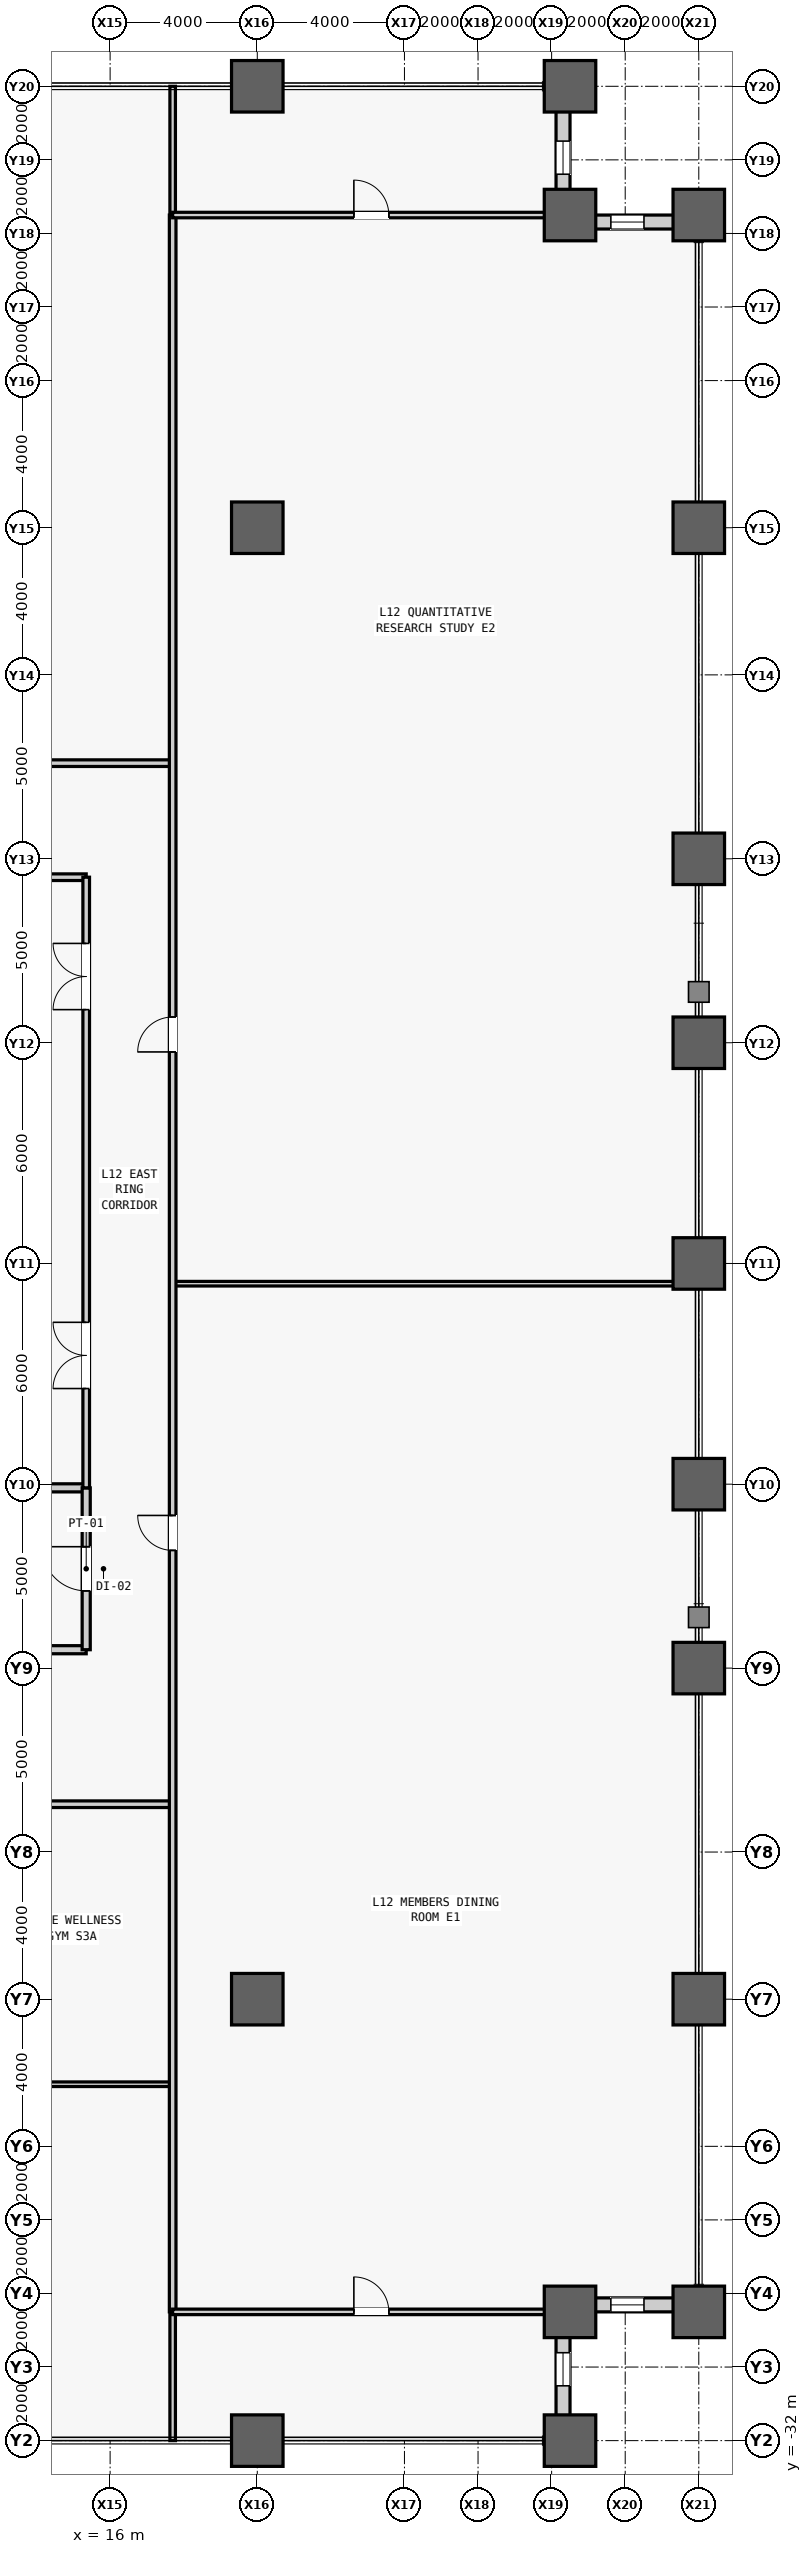
"""IFC4 building model, lengths in metres.
Left out: names, types, materials, properties, quantities, classifications, styles, units other than length and angle.
Written with IfcOpenShell. Run it as: python <this file> out.ifc"""

import sys

from ifc_helpers import new_model, si_unit, direction, frame, frame_2d, origin, origin_2d, place, context, subcontext, project, spatial, rectangle, hollow_rectangle, extrude, source, transform, mapped, element, fill, save


model = new_model("IFC4")
c1 = context("Model", 3, precision=1e-05, world=origin(), true_north=direction((0.0, 1.0)))
c2 = subcontext(c1, "Body", "Model", "MODEL_VIEW")
j1 = project(units=[si_unit("LENGTHUNIT", "METRE"), si_unit("PLANEANGLEUNIT", "RADIAN")], contexts=[c1])
p1 = place(None, origin())
s1 = spatial("IfcSite", under=j1, at=p1, CompositionType="ELEMENT")
p2 = place(p1, origin())
s2 = spatial("IfcBuilding", under=s1, at=p2, CompositionType="ELEMENT")
p3 = place(p2, frame((0.0, 0.0, 57.8)))
s3 = spatial("IfcBuildingStorey", under=s2, at=p3, CompositionType="ELEMENT", Elevation=57.8)
m1 = source(origin(), c2, "Body", "SweptSolid", [
    extrude(hollow_rectangle(XDim=1.4, YDim=1.4, WallThickness=0.075, at=origin_2d()), origin(), (0.0, 0.0, 1.0), 4.2),
])
for number, where, z_axis, x_axis in (
    (1, (20.0, -32.0, 0.0), (0.0, 0.0, 1.0), (1.0, 0.0, 0.0)),
    (2, (20.0, -20.0, 0.0), (0.0, 0.0, 1.0), (1.0, 0.0, 0.0)),
    (3, (20.0, 20.0, 0.0), (0.0, 0.0, 1.0), (1.0, 0.0, 0.0)),
    (4, (20.0, 32.0, 0.0), (0.0, 0.0, 1.0), (1.0, 0.0, 0.0)),
    (5, (28.5, -32.0, 0.0), (0.0, 0.0, 1.0), (1.0, 0.0, 0.0)),
    (6, (28.5, -28.5, 0.0), (0.0, 0.0, 1.0), (1.0, 0.0, 0.0)),
    (7, (28.5, 28.5, 0.0), (0.0, 0.0, 1.0), (1.0, 0.0, 0.0)),
    (8, (28.5, 32.0, 0.0), (0.0, 0.0, 1.0), (1.0, 0.0, 0.0)),
    (9, (32.0, -28.5, 0.0), (0.0, 0.0, 1.0), (1.0, 0.0, 0.0)),
    (10, (32.0, -20.0, 0.0), (0.0, 0.0, 1.0), (1.0, 0.0, 0.0)),
    (11, (32.0, -11.0, 0.0), (0.0, 0.0, 1.0), (1.0, 0.0, 0.0)),
    (12, (32.0, -6.0, 0.0), (0.0, 0.0, 1.0), (1.0, 0.0, 0.0)),
    (13, (32.0, 0.0, 0.0), (0.0, 0.0, 1.0), (1.0, 0.0, 0.0)),
    (14, (32.0, 6.0, 0.0), (0.0, 0.0, 1.0), (1.0, 0.0, 0.0)),
    (15, (32.0, 11.0, 0.0), (0.0, 0.0, 1.0), (1.0, 0.0, 0.0)),
    (16, (32.0, 20.0, 0.0), (0.0, 0.0, 1.0), (1.0, 0.0, 0.0)),
    (17, (32.0, 28.5, 0.0), (0.0, 0.0, 1.0), (1.0, 0.0, 0.0)),
):
    element("IfcColumn", number, at=place(p3, frame(where, z_axis=z_axis, x_axis=x_axis)), inside=s3, PredefinedType="COLUMN", context=c2, shape_type="MappedRepresentation", body=[
        mapped(m1, transform((0.0, 0.0, 0.0), scale=1.0)),
    ])
m2 = source(origin(), c2, "Body", "SweptSolid", [
    extrude(rectangle(XDim=3.12, YDim=0.38, at=frame_2d((1.56, 0.0))), origin(), (0.0, 0.0, 1.0), 3.245),
])
p4 = place(p3, frame((28.31, -31.62, 0.0), z_axis=(0.0, 0.0, 1.0), x_axis=(0.0, 1.0, 0.0)))
e18 = element("IfcWall", 18, at=p4, inside=s3, PredefinedType="STANDARD", context=c2, shape_type="MappedRepresentation", body=[
    mapped(m2, transform((0.0, 0.0, 0.0), scale=1.0)),
])
m3 = source(origin(), c2, "Body", "SweptSolid", [
    extrude(rectangle(XDim=0.9, YDim=2.4, at=frame_2d((0.45, 1.2))), frame((0.0, 0.2, 0.0), z_axis=(0.0, -1.0, 0.0), x_axis=(1.0, 0.0, 0.0)), (0.0, 0.0, 1.0), 0.4),
])
p5 = place(p4, frame((1.11, 0.0, 0.5)))
e19 = element("IfcOpeningElement", 19, at=p5, cuts=e18, PredefinedType="OPENING", context=c2, shape_type="MappedRepresentation", body=[
    mapped(m3, transform((0.0, 0.0, 0.0), scale=1.0)),
])
p6 = place(p3, frame((28.5, -28.31, 0.0), z_axis=(0.0, 0.0, 1.0), x_axis=(1.0, 0.0, 0.0)))
e20 = element("IfcWall", 20, at=p6, inside=s3, PredefinedType="STANDARD", context=c2, shape_type="MappedRepresentation", body=[
    mapped(m2, transform((0.0, 0.0, 0.0), scale=1.0)),
])
p7 = place(p6, frame((1.11, 0.0, 0.5)))
e21 = element("IfcOpeningElement", 21, at=p7, cuts=e20, PredefinedType="OPENING", context=c2, shape_type="MappedRepresentation", body=[
    mapped(m3, transform((0.0, 0.0, 0.0), scale=1.0)),
])
p8 = place(p3, frame((28.5, 28.31, 0.0), z_axis=(0.0, 0.0, 1.0), x_axis=(1.0, 0.0, 0.0)))
e22 = element("IfcWall", 22, at=p8, inside=s3, PredefinedType="STANDARD", context=c2, shape_type="MappedRepresentation", body=[
    mapped(m2, transform((0.0, 0.0, 0.0), scale=1.0)),
])
p9 = place(p8, frame((1.11, 0.0, 0.5)))
e23 = element("IfcOpeningElement", 23, at=p9, cuts=e22, PredefinedType="OPENING", context=c2, shape_type="MappedRepresentation", body=[
    mapped(m3, transform((0.0, 0.0, 0.0), scale=1.0)),
])
p10 = place(p3, frame((28.31, 28.5, 0.0), z_axis=(0.0, 0.0, 1.0), x_axis=(0.0, 1.0, 0.0)))
e24 = element("IfcWall", 24, at=p10, inside=s3, PredefinedType="STANDARD", context=c2, shape_type="MappedRepresentation", body=[
    mapped(m2, transform((0.0, 0.0, 0.0), scale=1.0)),
])
p11 = place(p10, frame((1.11, 0.0, 0.5)))
e25 = element("IfcOpeningElement", 25, at=p11, cuts=e24, PredefinedType="OPENING", context=c2, shape_type="MappedRepresentation", body=[
    mapped(m3, transform((0.0, 0.0, 0.0), scale=1.0)),
])
m4 = source(origin(), c2, "Body", "SweptSolid", [
    extrude(rectangle(XDim=4.05, YDim=0.22, at=frame_2d((2.025, 0.0))), origin(), (0.0, 0.0, 1.0), 3.94),
])
p12 = place(p3, frame((11.3, -10.5, 0.0), z_axis=(0.0, 0.0, 1.0), x_axis=(1.0, 0.0, 0.0)))
e26 = element("IfcWall", 26, at=p12, inside=s3, PredefinedType="PARTITIONING", context=c2, shape_type="MappedRepresentation", body=[
    mapped(m4, transform((0.0, 0.0, 0.0), scale=1.0)),
])
m5 = source(origin(), c2, "Body", "SweptSolid", [
    extrude(rectangle(XDim=4.05, YDim=0.22, at=frame_2d((2.025, 0.0))), origin(), (0.0, 0.0, 1.0), 3.085),
])
p13 = place(p3, frame((11.3, -6.1, 0.0), z_axis=(0.0, 0.0, 1.0), x_axis=(1.0, 0.0, 0.0)))
e27 = element("IfcWall", 27, at=p13, inside=s3, PredefinedType="PARTITIONING", context=c2, shape_type="MappedRepresentation", body=[
    mapped(m5, transform((0.0, 0.0, 0.0), scale=1.0)),
])
m6 = source(origin(), c2, "Body", "SweptSolid", [
    extrude(rectangle(XDim=4.4, YDim=0.22, at=frame_2d((2.2, 0.0))), origin(), (0.0, 0.0, 1.0), 3.94),
])
p14 = place(p3, frame((15.35, -10.5, 0.0), z_axis=(0.0, 0.0, 1.0), x_axis=(0.0, 1.0, 0.0)))
e28 = element("IfcWall", 28, at=p14, inside=s3, PredefinedType="PARTITIONING", context=c2, shape_type="MappedRepresentation", body=[
    mapped(m6, transform((0.0, 0.0, 0.0), scale=1.0)),
])
m7 = source(origin(), c2, "Body", "SweptSolid", [
    extrude(rectangle(XDim=1.2, YDim=2.2, at=frame_2d((0.6, 1.1))), frame((0.0, 0.12, 0.0), z_axis=(0.0, -1.0, 0.0), x_axis=(1.0, 0.0, 0.0)), (0.0, 0.0, 1.0), 0.24),
])
p15 = place(p14, frame((1.6, 0.0, 0.0)))
e29 = element("IfcOpeningElement", 29, at=p15, cuts=e28, PredefinedType="OPENING", context=c2, shape_type="MappedRepresentation", body=[
    mapped(m7, transform((0.0, 0.0, 0.0), scale=1.0)),
])
m8 = source(origin(), c2, "Body", "SweptSolid", [
    extrude(rectangle(XDim=4.05, YDim=0.18, at=frame_2d((2.025, 0.0))), origin(), (0.0, 0.0, 1.0), 3.94),
])
p16 = place(p3, frame((11.3, 10.5, 0.0), z_axis=(0.0, 0.0, 1.0), x_axis=(1.0, 0.0, 0.0)))
e30 = element("IfcWall", 30, at=p16, inside=s3, PredefinedType="PARTITIONING", context=c2, shape_type="MappedRepresentation", body=[
    mapped(m8, transform((0.0, 0.0, 0.0), scale=1.0)),
])
m9 = source(origin(), c2, "Body", "SweptSolid", [
    extrude(rectangle(XDim=16.6, YDim=0.18, at=frame_2d((8.3, 0.0))), origin(), (0.0, 0.0, 1.0), 3.94),
])
p17 = place(p3, frame((15.35, -6.1, 0.0), z_axis=(0.0, 0.0, 1.0), x_axis=(0.0, 1.0, 0.0)))
e31 = element("IfcWall", 31, at=p17, inside=s3, PredefinedType="PARTITIONING", context=c2, shape_type="MappedRepresentation", body=[
    mapped(m9, transform((0.0, 0.0, 0.0), scale=1.0)),
])
m10 = source(origin(), c2, "Body", "SweptSolid", [
    extrude(rectangle(XDim=1.8, YDim=2.25, at=frame_2d((0.9, 1.125))), frame((0.0, 0.1, 0.0), z_axis=(0.0, -1.0, 0.0), x_axis=(1.0, 0.0, 0.0)), (0.0, 0.0, 1.0), 0.2),
])
p18 = place(p17, frame((2.7, 0.0, 0.0)))
e32 = element("IfcOpeningElement", 32, at=p18, cuts=e31, PredefinedType="OPENING", context=c2, shape_type="MappedRepresentation", body=[
    mapped(m10, transform((0.0, 0.0, 0.0), scale=1.0)),
])
p19 = place(p17, frame((13.0, 0.0, 0.0)))
e33 = element("IfcOpeningElement", 33, at=p19, cuts=e31, PredefinedType="OPENING", context=c2, shape_type="MappedRepresentation", body=[
    mapped(m10, transform((0.0, 0.0, 0.0), scale=1.0)),
])
m11 = source(origin(), c2, "Body", "SweptSolid", [
    extrude(rectangle(XDim=10.388, YDim=0.125, at=frame_2d((5.194, 0.0))), origin(), (0.0, 0.0, 1.0), 3.94),
])
p20 = place(p3, frame((7.312, -22.312, 0.0), z_axis=(0.0, 0.0, 1.0), x_axis=(1.0, 0.0, 0.0)))
e34 = element("IfcWall", 34, at=p20, inside=s3, PredefinedType="PARTITIONING", context=c2, shape_type="MappedRepresentation", body=[
    mapped(m11, transform((0.0, 0.0, 0.0), scale=1.0)),
])
m12 = source(origin(), c2, "Body", "SweptSolid", [
    extrude(rectangle(XDim=0.95, YDim=2.15, at=frame_2d((0.475, 1.075))), frame((0.0, 0.073, 0.0), z_axis=(0.0, -1.0, 0.0), x_axis=(1.0, 0.0, 0.0)), (0.0, 0.0, 1.0), 0.145),
])
p21 = place(p20, frame((4.719, 0.0, 0.0)))
e35 = element("IfcOpeningElement", 35, at=p21, cuts=e34, PredefinedType="OPENING", context=c2, shape_type="MappedRepresentation", body=[
    mapped(m12, transform((0.0, 0.0, 0.0), scale=1.0)),
])
m13 = source(origin(), c2, "Body", "SweptSolid", [
    extrude(rectangle(XDim=37.1, YDim=0.18, at=frame_2d((18.55, 0.0))), origin(), (0.0, 0.0, 1.0), 3.94),
])
p22 = place(p3, frame((-19.4, -14.7, 0.0), z_axis=(0.0, 0.0, 1.0), x_axis=(1.0, 0.0, 0.0)))
e36 = element("IfcWall", 36, at=p22, inside=s3, PredefinedType="PARTITIONING", context=c2, shape_type="MappedRepresentation", body=[
    mapped(m13, transform((0.0, 0.0, 0.0), scale=1.0)),
])
m14 = source(origin(), c2, "Body", "SweptSolid", [
    extrude(rectangle(XDim=1.05, YDim=2.2, at=frame_2d((0.525, 1.1))), frame((0.0, 0.1, 0.0), z_axis=(0.0, -1.0, 0.0), x_axis=(1.0, 0.0, 0.0)), (0.0, 0.0, 1.0), 0.2),
])
p23 = place(p22, frame((8.653, 0.0, 0.0)))
e37 = element("IfcOpeningElement", 37, at=p23, cuts=e36, PredefinedType="OPENING", context=c2, shape_type="MappedRepresentation", body=[
    mapped(m14, transform((0.0, 0.0, 0.0), scale=1.0)),
])
p24 = place(p22, frame((19.509, 0.0, 0.0)))
e38 = element("IfcOpeningElement", 38, at=p24, cuts=e36, PredefinedType="OPENING", context=c2, shape_type="MappedRepresentation", body=[
    mapped(m14, transform((0.0, 0.0, 0.0), scale=1.0)),
])
p25 = place(p22, frame((29.731, 0.0, 0.0)))
e39 = element("IfcOpeningElement", 39, at=p25, cuts=e36, PredefinedType="OPENING", context=c2, shape_type="MappedRepresentation", body=[
    mapped(m14, transform((0.0, 0.0, 0.0), scale=1.0)),
])
p26 = place(p3, frame((-19.4, 13.6, 0.0), z_axis=(0.0, 0.0, 1.0), x_axis=(1.0, 0.0, 0.0)))
e40 = element("IfcWall", 40, at=p26, inside=s3, PredefinedType="PARTITIONING", context=c2, shape_type="MappedRepresentation", body=[
    mapped(m13, transform((0.0, 0.0, 0.0), scale=1.0)),
])
p27 = place(p26, frame((10.879, 0.0, 0.0)))
e41 = element("IfcOpeningElement", 41, at=p27, cuts=e40, PredefinedType="OPENING", context=c2, shape_type="MappedRepresentation", body=[
    mapped(m14, transform((0.0, 0.0, 0.0), scale=1.0)),
])
p28 = place(p26, frame((25.279, 0.0, 0.0)))
e42 = element("IfcOpeningElement", 42, at=p28, cuts=e40, PredefinedType="OPENING", context=c2, shape_type="MappedRepresentation", body=[
    mapped(m14, transform((0.0, 0.0, 0.0), scale=1.0)),
])
m15 = source(origin(), c2, "Body", "SweptSolid", [
    extrude(rectangle(XDim=3.5, YDim=0.15, at=frame_2d((1.75, 0.0))), origin(), (0.0, 0.0, 1.0), 3.94),
])
for number, where, z_axis, x_axis in (
    (43, (17.7, -32.0, 0.0), (0.0, 0.0, 1.0), (0.0, 1.0, 0.0)),
    (44, (17.7, 28.5, 0.0), (0.0, 0.0, 1.0), (0.0, 1.0, 0.0)),
):
    element("IfcWall", number, at=place(p3, frame(where, z_axis=z_axis, x_axis=x_axis)), inside=s3, PredefinedType="PARTITIONING", context=c2, shape_type="MappedRepresentation", body=[
        mapped(m15, transform((0.0, 0.0, 0.0), scale=1.0)),
    ])
m16 = source(origin(), c2, "Body", "SweptSolid", [
    extrude(rectangle(XDim=14.3, YDim=0.125, at=frame_2d((7.15, 0.0))), origin(), (0.0, 0.0, 1.0), 3.94),
])
p29 = place(p3, frame((17.7, -0.55, 0.0), z_axis=(0.0, 0.0, 1.0), x_axis=(1.0, 0.0, 0.0)))
e45 = element("IfcWall", 45, at=p29, inside=s3, PredefinedType="PARTITIONING", context=c2, shape_type="MappedRepresentation", body=[
    mapped(m16, transform((0.0, 0.0, 0.0), scale=1.0)),
])
m17 = source(origin(), c2, "Body", "SweptSolid", [
    extrude(rectangle(XDim=57.0, YDim=0.18, at=frame_2d((28.5, 0.0))), origin(), (0.0, 0.0, 1.0), 3.94),
])
p30 = place(p3, frame((17.7, -28.5, 0.0), z_axis=(0.0, 0.0, 1.0), x_axis=(0.0, 1.0, 0.0)))
e46 = element("IfcWall", 46, at=p30, inside=s3, PredefinedType="PARTITIONING", context=c2, shape_type="MappedRepresentation", body=[
    mapped(m17, transform((0.0, 0.0, 0.0), scale=1.0)),
])
m18 = source(origin(), c2, "Body", "SweptSolid", [
    extrude(rectangle(XDim=0.95, YDim=2.15, at=frame_2d((0.475, 1.075))), frame((0.0, 0.1, 0.0), z_axis=(0.0, -1.0, 0.0), x_axis=(1.0, 0.0, 0.0)), (0.0, 0.0, 1.0), 0.2),
])
p31 = place(p30, frame((20.7, 0.0, 0.0)))
e47 = element("IfcOpeningElement", 47, at=p31, cuts=e46, PredefinedType="OPENING", context=c2, shape_type="MappedRepresentation", body=[
    mapped(m18, transform((0.0, 0.0, 0.0), scale=1.0)),
])
p32 = place(p30, frame((34.25, 0.0, 0.0)))
e48 = element("IfcOpeningElement", 48, at=p32, cuts=e46, PredefinedType="OPENING", context=c2, shape_type="MappedRepresentation", body=[
    mapped(m18, transform((0.0, 0.0, 0.0), scale=1.0)),
])
m19 = source(origin(), c2, "Body", "SweptSolid", [
    extrude(rectangle(XDim=10.8, YDim=0.15, at=frame_2d((5.4, 0.0))), origin(), (0.0, 0.0, 1.0), 3.94),
])
p33 = place(p3, frame((17.7, -28.5, 0.0), z_axis=(0.0, 0.0, 1.0), x_axis=(1.0, 0.0, 0.0)))
e49 = element("IfcWall", 49, at=p33, inside=s3, PredefinedType="PARTITIONING", context=c2, shape_type="MappedRepresentation", body=[
    mapped(m19, transform((0.0, 0.0, 0.0), scale=1.0)),
])
m20 = source(origin(), c2, "Body", "SweptSolid", [
    extrude(rectangle(XDim=0.95, YDim=2.15, at=frame_2d((0.475, 1.075))), frame((0.0, 0.085, 0.0), z_axis=(0.0, -1.0, 0.0), x_axis=(1.0, 0.0, 0.0)), (0.0, 0.0, 1.0), 0.17),
])
p34 = place(p33, frame((4.925, 0.0, 0.0)))
e50 = element("IfcOpeningElement", 50, at=p34, cuts=e49, PredefinedType="OPENING", context=c2, shape_type="MappedRepresentation", body=[
    mapped(m20, transform((0.0, 0.0, 0.0), scale=1.0)),
])
p35 = place(p3, frame((17.7, 28.5, 0.0), z_axis=(0.0, 0.0, 1.0), x_axis=(1.0, 0.0, 0.0)))
e51 = element("IfcWall", 51, at=p35, inside=s3, PredefinedType="PARTITIONING", context=c2, shape_type="MappedRepresentation", body=[
    mapped(m19, transform((0.0, 0.0, 0.0), scale=1.0)),
])
p36 = place(p35, frame((4.925, 0.0, 0.0)))
e52 = element("IfcOpeningElement", 52, at=p36, cuts=e51, PredefinedType="OPENING", context=c2, shape_type="MappedRepresentation", body=[
    mapped(m20, transform((0.0, 0.0, 0.0), scale=1.0)),
])
m21 = source(origin(), c2, "Body", "SweptSolid", [
    extrude(rectangle(XDim=0.9, YDim=2.4, at=frame_2d((0.45, 1.2))), frame((0.0, 0.03, 0.0), z_axis=(0.0, -1.0, 0.0), x_axis=(1.0, 0.0, 0.0)), (0.0, 0.0, 1.0), 0.06),
])
p37 = place(p5, origin())
e53 = element("IfcWindow", 53, at=p37, inside=s3, PartitioningType="SINGLE_PANEL", PredefinedType="WINDOW", context=c2, shape_type="MappedRepresentation", body=[
    mapped(m21, transform((0.0, 0.0, 0.0), scale=1.0)),
])
fill(e19, e53)
p38 = place(p7, origin())
e54 = element("IfcWindow", 54, at=p38, inside=s3, PartitioningType="SINGLE_PANEL", PredefinedType="WINDOW", context=c2, shape_type="MappedRepresentation", body=[
    mapped(m21, transform((0.0, 0.0, 0.0), scale=1.0)),
])
fill(e21, e54)
p39 = place(p9, origin())
e55 = element("IfcWindow", 55, at=p39, inside=s3, PartitioningType="SINGLE_PANEL", PredefinedType="WINDOW", context=c2, shape_type="MappedRepresentation", body=[
    mapped(m21, transform((0.0, 0.0, 0.0), scale=1.0)),
])
fill(e23, e55)
p40 = place(p11, origin())
e56 = element("IfcWindow", 56, at=p40, inside=s3, PartitioningType="SINGLE_PANEL", PredefinedType="WINDOW", context=c2, shape_type="MappedRepresentation", body=[
    mapped(m21, transform((0.0, 0.0, 0.0), scale=1.0)),
])
fill(e25, e56)
m22 = source(origin(), c2, "Body", "SweptSolid", [
    extrude(rectangle(XDim=1.2, YDim=2.2, at=frame_2d((0.6, 1.1))), frame((0.0, 0.025, 0.0), z_axis=(0.0, -1.0, 0.0), x_axis=(1.0, 0.0, 0.0)), (0.0, 0.0, 1.0), 0.05),
])
p41 = place(p15, origin())
e57 = element("IfcDoor", 57, at=p41, inside=s3, OperationType="SINGLE_SWING_RIGHT", PredefinedType="DOOR", context=c2, shape_type="MappedRepresentation", body=[
    mapped(m22, transform((0.0, 0.0, 0.0), scale=1.0)),
])
fill(e29, e57)
m23 = source(origin(), c2, "Body", "SweptSolid", [
    extrude(rectangle(XDim=1.8, YDim=2.25, at=frame_2d((0.9, 1.125))), frame((0.0, 0.025, 0.0), z_axis=(0.0, -1.0, 0.0), x_axis=(1.0, 0.0, 0.0)), (0.0, 0.0, 1.0), 0.05),
])
p42 = place(p18, origin())
e58 = element("IfcDoor", 58, at=p42, inside=s3, OperationType="SINGLE_SWING_RIGHT", PredefinedType="DOOR", context=c2, shape_type="MappedRepresentation", body=[
    mapped(m23, transform((0.0, 0.0, 0.0), scale=1.0)),
])
fill(e32, e58)
p43 = place(p19, origin())
e59 = element("IfcDoor", 59, at=p43, inside=s3, OperationType="SINGLE_SWING_LEFT", PredefinedType="DOOR", context=c2, shape_type="MappedRepresentation", body=[
    mapped(m23, transform((0.0, 0.0, 0.0), scale=1.0)),
])
fill(e33, e59)
m24 = source(origin(), c2, "Body", "SweptSolid", [
    extrude(rectangle(XDim=0.95, YDim=2.15, at=frame_2d((0.475, 1.075))), frame((0.0, 0.025, 0.0), z_axis=(0.0, -1.0, 0.0), x_axis=(1.0, 0.0, 0.0)), (0.0, 0.0, 1.0), 0.05),
])
p44 = place(p31, origin())
e60 = element("IfcDoor", 60, at=p44, inside=s3, OperationType="SINGLE_SWING_RIGHT", PredefinedType="DOOR", context=c2, shape_type="MappedRepresentation", body=[
    mapped(m24, transform((0.0, 0.0, 0.0), scale=1.0)),
])
fill(e47, e60)
p45 = place(p32, origin())
e61 = element("IfcDoor", 61, at=p45, inside=s3, OperationType="SINGLE_SWING_LEFT", PredefinedType="DOOR", context=c2, shape_type="MappedRepresentation", body=[
    mapped(m24, transform((0.0, 0.0, 0.0), scale=1.0)),
])
fill(e48, e61)
p46 = place(p34, origin())
e62 = element("IfcDoor", 62, at=p46, inside=s3, OperationType="SINGLE_SWING_LEFT", PredefinedType="DOOR", context=c2, shape_type="MappedRepresentation", body=[
    mapped(m24, transform((0.0, 0.0, 0.0), scale=1.0)),
])
fill(e50, e62)
p47 = place(p36, origin())
e63 = element("IfcDoor", 63, at=p47, inside=s3, OperationType="SINGLE_SWING_LEFT", PredefinedType="DOOR", context=c2, shape_type="MappedRepresentation", body=[
    mapped(m24, transform((0.0, 0.0, 0.0), scale=1.0)),
])
fill(e52, e63)
save(model, sys.argv[1])
